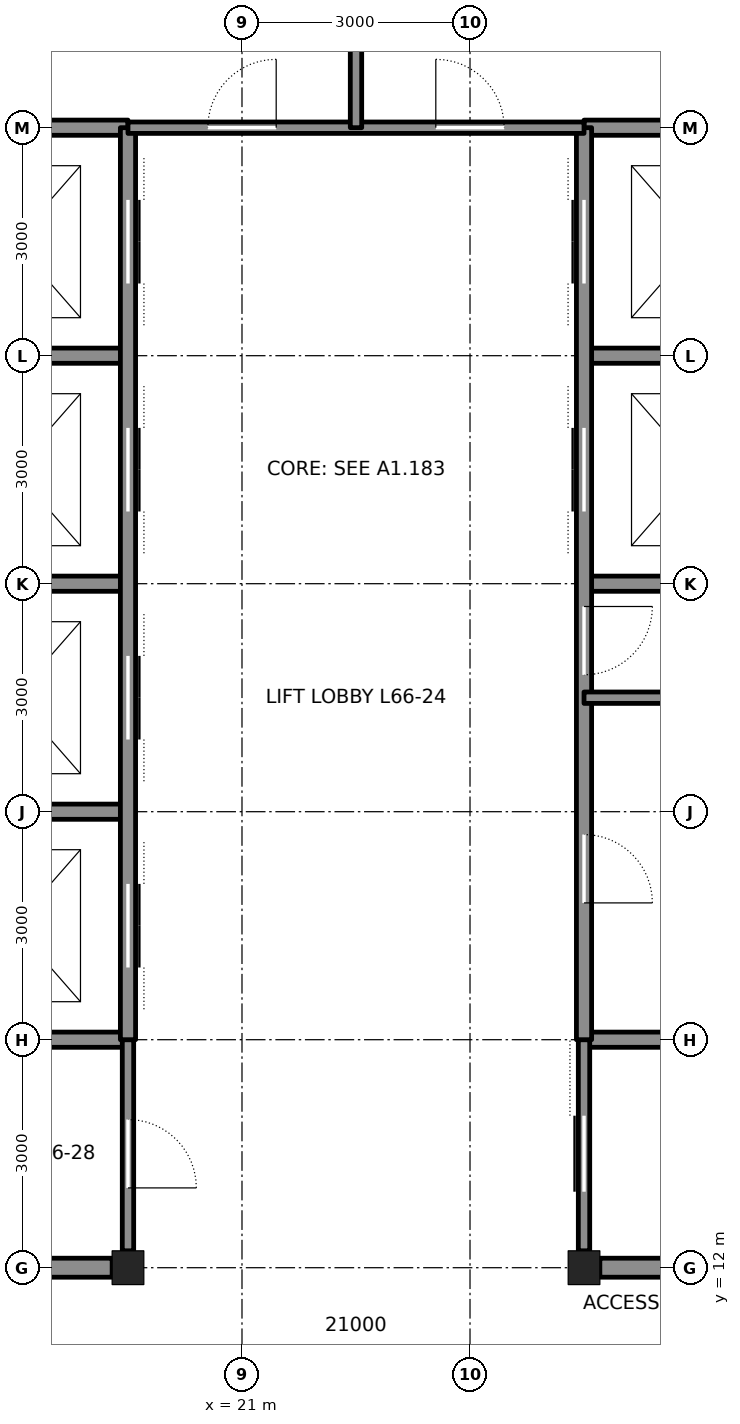
"""IFC4 building model, lengths in metres.
Left out: names, types, materials, properties, quantities, classifications, styles, units other than length and angle.
Written with IfcOpenShell. Run it as: python <this file> out.ifc"""

import sys

from ifc_helpers import new_model, si_unit, direction, frame, frame_2d, origin, origin_2d, place, context, subcontext, project, spatial, rectangle, i_section, extrude, element, fill, save


model = new_model("IFC4")
c1 = context("Model", 3, precision=1e-05, world=origin(), true_north=direction((0.0, 1.0)))
c2 = subcontext(c1, "Body", "Model", "MODEL_VIEW")
j1 = project(units=[si_unit("LENGTHUNIT", "METRE"), si_unit("PLANEANGLEUNIT", "RADIAN")], contexts=[c1])
p1 = place(None, origin())
s1 = spatial("IfcSite", under=j1, at=p1, CompositionType="ELEMENT")
p2 = place(p1, origin())
s2 = spatial("IfcBuilding", under=s1, at=p2, CompositionType="ELEMENT")
p3 = place(p2, frame((0.0, 0.0, 295.8)))
s3 = spatial("IfcBuildingStorey", under=s2, at=p3, CompositionType="ELEMENT", Elevation=295.8)
for number, where, z_axis, x_axis in (
    (1, (19.5, 12.0, 0.0), (0.0, 0.0, 1.0), (1.0, 0.0, 0.0)),
    (2, (25.5, 12.0, 0.0), (0.0, 0.0, 1.0), (1.0, 0.0, 0.0)),
):
    element("IfcColumn", number, at=place(p3, frame(where, z_axis=z_axis, x_axis=x_axis)), inside=s3, PredefinedType="COLUMN", context=c2, shape_type="SweptSolid", body=[
        extrude(i_section(OverallWidth=0.417, OverallDepth=0.445, WebThickness=0.039, FlangeThickness=0.063, at=origin_2d()), origin(), (0.0, 0.0, 1.0), 4.2),
    ])
for number, where, z_axis, x_axis in (
    (3, (16.708, 12.0, 0.0), (0.0, 0.0, 1.0), (1.0, 0.0, 0.0)),
    (4, (25.708, 12.0, 0.0), (0.0, 0.0, 1.0), (1.0, 0.0, 0.0)),
):
    element("IfcWall", number, at=place(p3, frame(where, z_axis=z_axis, x_axis=x_axis)), inside=s3, PredefinedType="SOLIDWALL", context=c2, shape_type="SweptSolid", body=[
        extrude(rectangle(XDim=2.583, YDim=0.25, at=frame_2d((1.292, 0.0))), origin(), (0.0, 0.0, 1.0), 3.181),
    ])
for number, where, z_axis, x_axis in (
    (5, (12.0, 15.0, 0.0), (0.0, 0.0, 1.0), (1.0, 0.0, 0.0)),
    (6, (25.5, 15.0, 0.0), (0.0, 0.0, 1.0), (1.0, 0.0, 0.0)),
):
    element("IfcWall", number, at=place(p3, frame(where, z_axis=z_axis, x_axis=x_axis)), inside=s3, PredefinedType="SOLIDWALL", context=c2, shape_type="SweptSolid", body=[
        extrude(rectangle(XDim=7.5, YDim=0.2, at=frame_2d((3.75, 0.0))), origin(), (0.0, 0.0, 1.0), 4.04),
    ])
for number, where, z_axis, x_axis in (
    (7, (16.708, 24.0, 0.0), (0.0, 0.0, 1.0), (1.0, 0.0, 0.0)),
    (8, (25.5, 24.0, 0.0), (0.0, 0.0, 1.0), (1.0, 0.0, 0.0)),
):
    element("IfcWall", number, at=place(p3, frame(where, z_axis=z_axis, x_axis=x_axis)), inside=s3, PredefinedType="SOLIDWALL", context=c2, shape_type="SweptSolid", body=[
        extrude(rectangle(XDim=2.792, YDim=0.2, at=frame_2d((1.396, 0.0))), origin(), (0.0, 0.0, 1.0), 3.09),
    ])
p4 = place(p3, frame((12.0, 27.0, 0.0), z_axis=(0.0, 0.0, 1.0), x_axis=(1.0, 0.0, 0.0)))
e9 = element("IfcWall", 9, at=p4, inside=s3, PredefinedType="SOLIDWALL", context=c2, shape_type="SweptSolid", body=[
    extrude(rectangle(XDim=7.5, YDim=0.2, at=frame_2d((3.75, 0.0))), origin(), (0.0, 0.0, 1.0), 4.04),
])
p5 = place(p4, frame((1.65, 0.0, 0.0)))
e10 = element("IfcOpeningElement", 10, at=p5, cuts=e9, PredefinedType="OPENING", context=c2, shape_type="SweptSolid", body=[
    extrude(rectangle(XDim=1.2, YDim=2.1, at=frame_2d((0.6, 1.05))), frame((0.0, 0.11, 0.0), z_axis=(0.0, -1.0, 0.0), x_axis=(1.0, 0.0, 0.0)), (0.0, 0.0, 1.0), 0.22),
])
for number, where, z_axis, x_axis in (
    (11, (25.5, 27.0, 0.0), (0.0, 0.0, 1.0), (1.0, 0.0, 0.0)),
    (12, (16.5, 18.0, 0.0), (0.0, 0.0, 1.0), (1.0, 0.0, 0.0)),
):
    element("IfcWall", number, at=place(p3, frame(where, z_axis=z_axis, x_axis=x_axis)), inside=s3, PredefinedType="SOLIDWALL", context=c2, shape_type="SweptSolid", body=[
        extrude(rectangle(XDim=3.0, YDim=0.2, at=frame_2d((1.5, 0.0))), origin(), (0.0, 0.0, 1.0), 4.04),
    ])
for number, where, z_axis, x_axis in (
    (13, (16.708, 21.0, 0.0), (0.0, 0.0, 1.0), (1.0, 0.0, 0.0)),
    (14, (25.5, 21.0, 0.0), (0.0, 0.0, 1.0), (1.0, 0.0, 0.0)),
):
    element("IfcWall", number, at=place(p3, frame(where, z_axis=z_axis, x_axis=x_axis)), inside=s3, PredefinedType="SOLIDWALL", context=c2, shape_type="SweptSolid", body=[
        extrude(rectangle(XDim=2.792, YDim=0.2, at=frame_2d((1.396, 0.0))), origin(), (0.0, 0.0, 1.0), 3.09),
    ])
p6 = place(p3, frame((19.5, 12.222, 0.0), z_axis=(0.0, 0.0, 1.0), x_axis=(0.0, 1.0, 0.0)))
e15 = element("IfcWall", 15, at=p6, inside=s3, PredefinedType="PARTITIONING", context=c2, shape_type="SweptSolid", body=[
    extrude(rectangle(XDim=2.778, YDim=0.15, at=frame_2d((1.389, 0.0))), origin(), (0.0, 0.0, 1.0), 3.064),
])
p7 = place(p6, frame((0.828, 0.0, 0.0)))
e16 = element("IfcOpeningElement", 16, at=p7, cuts=e15, PredefinedType="OPENING", context=c2, shape_type="SweptSolid", body=[
    extrude(rectangle(XDim=0.9, YDim=2.1, at=frame_2d((0.45, 1.05))), frame((0.0, 0.085, 0.0), z_axis=(0.0, -1.0, 0.0), x_axis=(1.0, 0.0, 0.0)), (0.0, 0.0, 1.0), 0.17),
])
p8 = place(p3, frame((19.5, 15.0, 0.0), z_axis=(0.0, 0.0, 1.0), x_axis=(0.0, 1.0, 0.0)))
e17 = element("IfcWall", 17, at=p8, inside=s3, PredefinedType="SOLIDWALL", context=c2, shape_type="SweptSolid", body=[
    extrude(rectangle(XDim=12.0, YDim=0.2, at=frame_2d((6.0, 0.0))), origin(), (0.0, 0.0, 1.0), 3.064),
])
p9 = place(p8, frame((0.95, 0.0, 0.0)))
e18 = element("IfcOpeningElement", 18, at=p9, cuts=e17, PredefinedType="OPENING", context=c2, shape_type="SweptSolid", body=[
    extrude(rectangle(XDim=1.1, YDim=2.1, at=frame_2d((0.55, 1.05))), frame((0.0, 0.11, 0.0), z_axis=(0.0, -1.0, 0.0), x_axis=(1.0, 0.0, 0.0)), (0.0, 0.0, 1.0), 0.22),
])
p10 = place(p8, frame((3.95, 0.0, 0.0)))
e19 = element("IfcOpeningElement", 19, at=p10, cuts=e17, PredefinedType="OPENING", context=c2, shape_type="SweptSolid", body=[
    extrude(rectangle(XDim=1.1, YDim=2.1, at=frame_2d((0.55, 1.05))), frame((0.0, 0.11, 0.0), z_axis=(0.0, -1.0, 0.0), x_axis=(1.0, 0.0, 0.0)), (0.0, 0.0, 1.0), 0.22),
])
p11 = place(p8, frame((6.95, 0.0, 0.0)))
e20 = element("IfcOpeningElement", 20, at=p11, cuts=e17, PredefinedType="OPENING", context=c2, shape_type="SweptSolid", body=[
    extrude(rectangle(XDim=1.1, YDim=2.1, at=frame_2d((0.55, 1.05))), frame((0.0, 0.11, 0.0), z_axis=(0.0, -1.0, 0.0), x_axis=(1.0, 0.0, 0.0)), (0.0, 0.0, 1.0), 0.22),
])
p12 = place(p8, frame((9.95, 0.0, 0.0)))
e21 = element("IfcOpeningElement", 21, at=p12, cuts=e17, PredefinedType="OPENING", context=c2, shape_type="SweptSolid", body=[
    extrude(rectangle(XDim=1.1, YDim=2.1, at=frame_2d((0.55, 1.05))), frame((0.0, 0.11, 0.0), z_axis=(0.0, -1.0, 0.0), x_axis=(1.0, 0.0, 0.0)), (0.0, 0.0, 1.0), 0.22),
])
p13 = place(p3, frame((25.5, 12.222, 0.0), z_axis=(0.0, 0.0, 1.0), x_axis=(0.0, 1.0, 0.0)))
e22 = element("IfcWall", 22, at=p13, inside=s3, PredefinedType="PARTITIONING", context=c2, shape_type="SweptSolid", body=[
    extrude(rectangle(XDim=2.778, YDim=0.15, at=frame_2d((1.389, 0.0))), origin(), (0.0, 0.0, 1.0), 3.064),
])
p14 = place(p13, frame((0.778, 0.0, 0.0)))
e23 = element("IfcOpeningElement", 23, at=p14, cuts=e22, PredefinedType="OPENING", context=c2, shape_type="SweptSolid", body=[
    extrude(rectangle(XDim=1.0, YDim=2.1, at=frame_2d((0.5, 1.05))), frame((0.0, 0.085, 0.0), z_axis=(0.0, -1.0, 0.0), x_axis=(1.0, 0.0, 0.0)), (0.0, 0.0, 1.0), 0.17),
])
p15 = place(p3, frame((25.5, 15.0, 0.0), z_axis=(0.0, 0.0, 1.0), x_axis=(0.0, 1.0, 0.0)))
e24 = element("IfcWall", 24, at=p15, inside=s3, PredefinedType="SOLIDWALL", context=c2, shape_type="SweptSolid", body=[
    extrude(rectangle(XDim=12.0, YDim=0.2, at=frame_2d((6.0, 0.0))), origin(), (0.0, 0.0, 1.0), 3.064),
])
p16 = place(p15, frame((1.8, 0.0, 0.0)))
e25 = element("IfcOpeningElement", 25, at=p16, cuts=e24, PredefinedType="OPENING", context=c2, shape_type="SweptSolid", body=[
    extrude(rectangle(XDim=0.9, YDim=2.1, at=frame_2d((0.45, 1.05))), frame((0.0, 0.11, 0.0), z_axis=(0.0, -1.0, 0.0), x_axis=(1.0, 0.0, 0.0)), (0.0, 0.0, 1.0), 0.22),
])
p17 = place(p15, frame((4.8, 0.0, 0.0)))
e26 = element("IfcOpeningElement", 26, at=p17, cuts=e24, PredefinedType="OPENING", context=c2, shape_type="SweptSolid", body=[
    extrude(rectangle(XDim=0.9, YDim=2.1, at=frame_2d((0.45, 1.05))), frame((0.0, 0.11, 0.0), z_axis=(0.0, -1.0, 0.0), x_axis=(1.0, 0.0, 0.0)), (0.0, 0.0, 1.0), 0.22),
])
p18 = place(p15, frame((6.95, 0.0, 0.0)))
e27 = element("IfcOpeningElement", 27, at=p18, cuts=e24, PredefinedType="OPENING", context=c2, shape_type="SweptSolid", body=[
    extrude(rectangle(XDim=1.1, YDim=2.1, at=frame_2d((0.55, 1.05))), frame((0.0, 0.11, 0.0), z_axis=(0.0, -1.0, 0.0), x_axis=(1.0, 0.0, 0.0)), (0.0, 0.0, 1.0), 0.22),
])
p19 = place(p15, frame((9.95, 0.0, 0.0)))
e28 = element("IfcOpeningElement", 28, at=p19, cuts=e24, PredefinedType="OPENING", context=c2, shape_type="SweptSolid", body=[
    extrude(rectangle(XDim=1.1, YDim=2.1, at=frame_2d((0.55, 1.05))), frame((0.0, 0.11, 0.0), z_axis=(0.0, -1.0, 0.0), x_axis=(1.0, 0.0, 0.0)), (0.0, 0.0, 1.0), 0.22),
])
p20 = place(p3, frame((19.5, 27.0, 0.0), z_axis=(0.0, 0.0, 1.0), x_axis=(1.0, 0.0, 0.0)))
e29 = element("IfcWall", 29, at=p20, inside=s3, PredefinedType="PARTITIONING", context=c2, shape_type="SweptSolid", body=[
    extrude(rectangle(XDim=6.0, YDim=0.15, at=frame_2d((3.0, 0.0))), origin(), (0.0, 0.0, 1.0), 4.04),
])
p21 = place(p20, frame((1.05, 0.0, 0.0)))
e30 = element("IfcOpeningElement", 30, at=p21, cuts=e29, PredefinedType="OPENING", context=c2, shape_type="SweptSolid", body=[
    extrude(rectangle(XDim=0.9, YDim=2.1, at=frame_2d((0.45, 1.05))), frame((0.0, 0.085, 0.0), z_axis=(0.0, -1.0, 0.0), x_axis=(1.0, 0.0, 0.0)), (0.0, 0.0, 1.0), 0.17),
])
p22 = place(p20, frame((4.05, 0.0, 0.0)))
e31 = element("IfcOpeningElement", 31, at=p22, cuts=e29, PredefinedType="OPENING", context=c2, shape_type="SweptSolid", body=[
    extrude(rectangle(XDim=0.9, YDim=2.1, at=frame_2d((0.45, 1.05))), frame((0.0, 0.085, 0.0), z_axis=(0.0, -1.0, 0.0), x_axis=(1.0, 0.0, 0.0)), (0.0, 0.0, 1.0), 0.17),
])
p23 = place(p3, frame((22.5, 27.0, 0.0), z_axis=(0.0, 0.0, 1.0), x_axis=(0.0, 1.0, 0.0)))
e32 = element("IfcWall", 32, at=p23, inside=s3, PredefinedType="PARTITIONING", context=c2, shape_type="SweptSolid", body=[
    extrude(rectangle(XDim=6.0, YDim=0.15, at=frame_2d((3.0, 0.0))), origin(), (0.0, 0.0, 1.0), 4.04),
])
p24 = place(p3, frame((25.5, 19.5, 0.0), z_axis=(0.0, 0.0, 1.0), x_axis=(1.0, 0.0, 0.0)))
e33 = element("IfcWall", 33, at=p24, inside=s3, PredefinedType="PARTITIONING", context=c2, shape_type="SweptSolid", body=[
    extrude(rectangle(XDim=3.0, YDim=0.15, at=frame_2d((1.5, 0.0))), origin(), (0.0, 0.0, 1.0), 4.04),
])
p25 = place(p21, origin())
e34 = element("IfcDoor", 34, at=p25, inside=s3, OperationType="SINGLE_SWING_RIGHT", PredefinedType="DOOR", context=c2, shape_type="SweptSolid", body=[
    extrude(rectangle(XDim=0.9, YDim=2.1, at=frame_2d((0.45, 1.05))), frame((0.0, 0.025, 0.0), z_axis=(0.0, -1.0, 0.0), x_axis=(1.0, 0.0, 0.0)), (0.0, 0.0, 1.0), 0.05),
])
fill(e30, e34)
p26 = place(p22, origin())
e35 = element("IfcDoor", 35, at=p26, inside=s3, OperationType="SINGLE_SWING_LEFT", PredefinedType="DOOR", context=c2, shape_type="SweptSolid", body=[
    extrude(rectangle(XDim=0.9, YDim=2.1, at=frame_2d((0.45, 1.05))), frame((0.0, 0.025, 0.0), z_axis=(0.0, -1.0, 0.0), x_axis=(1.0, 0.0, 0.0)), (0.0, 0.0, 1.0), 0.05),
])
fill(e31, e35)
p27 = place(p14, origin())
e36 = element("IfcDoor", 36, at=p27, inside=s3, OperationType="SLIDING_TO_LEFT", PredefinedType="DOOR", context=c2, shape_type="SweptSolid", body=[
    extrude(rectangle(XDim=1.0, YDim=2.1, at=frame_2d((0.5, 1.05))), frame((0.0, 0.025, 0.0), z_axis=(0.0, -1.0, 0.0), x_axis=(1.0, 0.0, 0.0)), (0.0, 0.0, 1.0), 0.05),
])
fill(e23, e36)
p28 = place(p16, frame((0.9, 0.0, 0.0), z_axis=(0.0, 0.0, 1.0), x_axis=(-1.0, 0.0, 0.0)))
e37 = element("IfcDoor", 37, at=p28, inside=s3, OperationType="SINGLE_SWING_RIGHT", PredefinedType="DOOR", context=c2, shape_type="SweptSolid", body=[
    extrude(rectangle(XDim=0.9, YDim=2.1, at=frame_2d((0.45, 1.05))), frame((0.0, 0.025, 0.0), z_axis=(0.0, -1.0, 0.0), x_axis=(1.0, 0.0, 0.0)), (0.0, 0.0, 1.0), 0.05),
])
fill(e25, e37)
p29 = place(p17, frame((0.9, 0.0, 0.0), z_axis=(0.0, 0.0, 1.0), x_axis=(-1.0, 0.0, 0.0)))
e38 = element("IfcDoor", 38, at=p29, inside=s3, OperationType="SINGLE_SWING_LEFT", PredefinedType="DOOR", context=c2, shape_type="SweptSolid", body=[
    extrude(rectangle(XDim=0.9, YDim=2.1, at=frame_2d((0.45, 1.05))), frame((0.0, 0.025, 0.0), z_axis=(0.0, -1.0, 0.0), x_axis=(1.0, 0.0, 0.0)), (0.0, 0.0, 1.0), 0.05),
])
fill(e26, e38)
p30 = place(p7, frame((0.9, 0.0, 0.0), z_axis=(0.0, 0.0, 1.0), x_axis=(-1.0, 0.0, 0.0)))
e39 = element("IfcDoor", 39, at=p30, inside=s3, OperationType="SINGLE_SWING_RIGHT", PredefinedType="DOOR", context=c2, shape_type="SweptSolid", body=[
    extrude(rectangle(XDim=0.9, YDim=2.1, at=frame_2d((0.45, 1.05))), frame((0.0, 0.025, 0.0), z_axis=(0.0, -1.0, 0.0), x_axis=(1.0, 0.0, 0.0)), (0.0, 0.0, 1.0), 0.05),
])
fill(e16, e39)
p31 = place(p9, origin())
e40 = element("IfcDoor", 40, at=p31, inside=s3, OperationType="DOUBLE_DOOR_SLIDING", PredefinedType="DOOR", context=c2, shape_type="SweptSolid", body=[
    extrude(rectangle(XDim=1.1, YDim=2.1, at=frame_2d((0.55, 1.05))), frame((0.0, 0.025, 0.0), z_axis=(0.0, -1.0, 0.0), x_axis=(1.0, 0.0, 0.0)), (0.0, 0.0, 1.0), 0.05),
])
fill(e18, e40)
p32 = place(p10, origin())
e41 = element("IfcDoor", 41, at=p32, inside=s3, OperationType="DOUBLE_DOOR_SLIDING", PredefinedType="DOOR", context=c2, shape_type="SweptSolid", body=[
    extrude(rectangle(XDim=1.1, YDim=2.1, at=frame_2d((0.55, 1.05))), frame((0.0, 0.025, 0.0), z_axis=(0.0, -1.0, 0.0), x_axis=(1.0, 0.0, 0.0)), (0.0, 0.0, 1.0), 0.05),
])
fill(e19, e41)
p33 = place(p11, origin())
e42 = element("IfcDoor", 42, at=p33, inside=s3, OperationType="DOUBLE_DOOR_SLIDING", PredefinedType="DOOR", context=c2, shape_type="SweptSolid", body=[
    extrude(rectangle(XDim=1.1, YDim=2.1, at=frame_2d((0.55, 1.05))), frame((0.0, 0.025, 0.0), z_axis=(0.0, -1.0, 0.0), x_axis=(1.0, 0.0, 0.0)), (0.0, 0.0, 1.0), 0.05),
])
fill(e20, e42)
p34 = place(p18, origin())
e43 = element("IfcDoor", 43, at=p34, inside=s3, OperationType="DOUBLE_DOOR_SLIDING", PredefinedType="DOOR", context=c2, shape_type="SweptSolid", body=[
    extrude(rectangle(XDim=1.1, YDim=2.1, at=frame_2d((0.55, 1.05))), frame((0.0, 0.025, 0.0), z_axis=(0.0, -1.0, 0.0), x_axis=(1.0, 0.0, 0.0)), (0.0, 0.0, 1.0), 0.05),
])
fill(e27, e43)
p35 = place(p12, origin())
e44 = element("IfcDoor", 44, at=p35, inside=s3, OperationType="DOUBLE_DOOR_SLIDING", PredefinedType="DOOR", context=c2, shape_type="SweptSolid", body=[
    extrude(rectangle(XDim=1.1, YDim=2.1, at=frame_2d((0.55, 1.05))), frame((0.0, 0.025, 0.0), z_axis=(0.0, -1.0, 0.0), x_axis=(1.0, 0.0, 0.0)), (0.0, 0.0, 1.0), 0.05),
])
fill(e21, e44)
p36 = place(p19, origin())
e45 = element("IfcDoor", 45, at=p36, inside=s3, OperationType="DOUBLE_DOOR_SLIDING", PredefinedType="DOOR", context=c2, shape_type="SweptSolid", body=[
    extrude(rectangle(XDim=1.1, YDim=2.1, at=frame_2d((0.55, 1.05))), frame((0.0, 0.025, 0.0), z_axis=(0.0, -1.0, 0.0), x_axis=(1.0, 0.0, 0.0)), (0.0, 0.0, 1.0), 0.05),
])
fill(e28, e45)
save(model, sys.argv[1])
